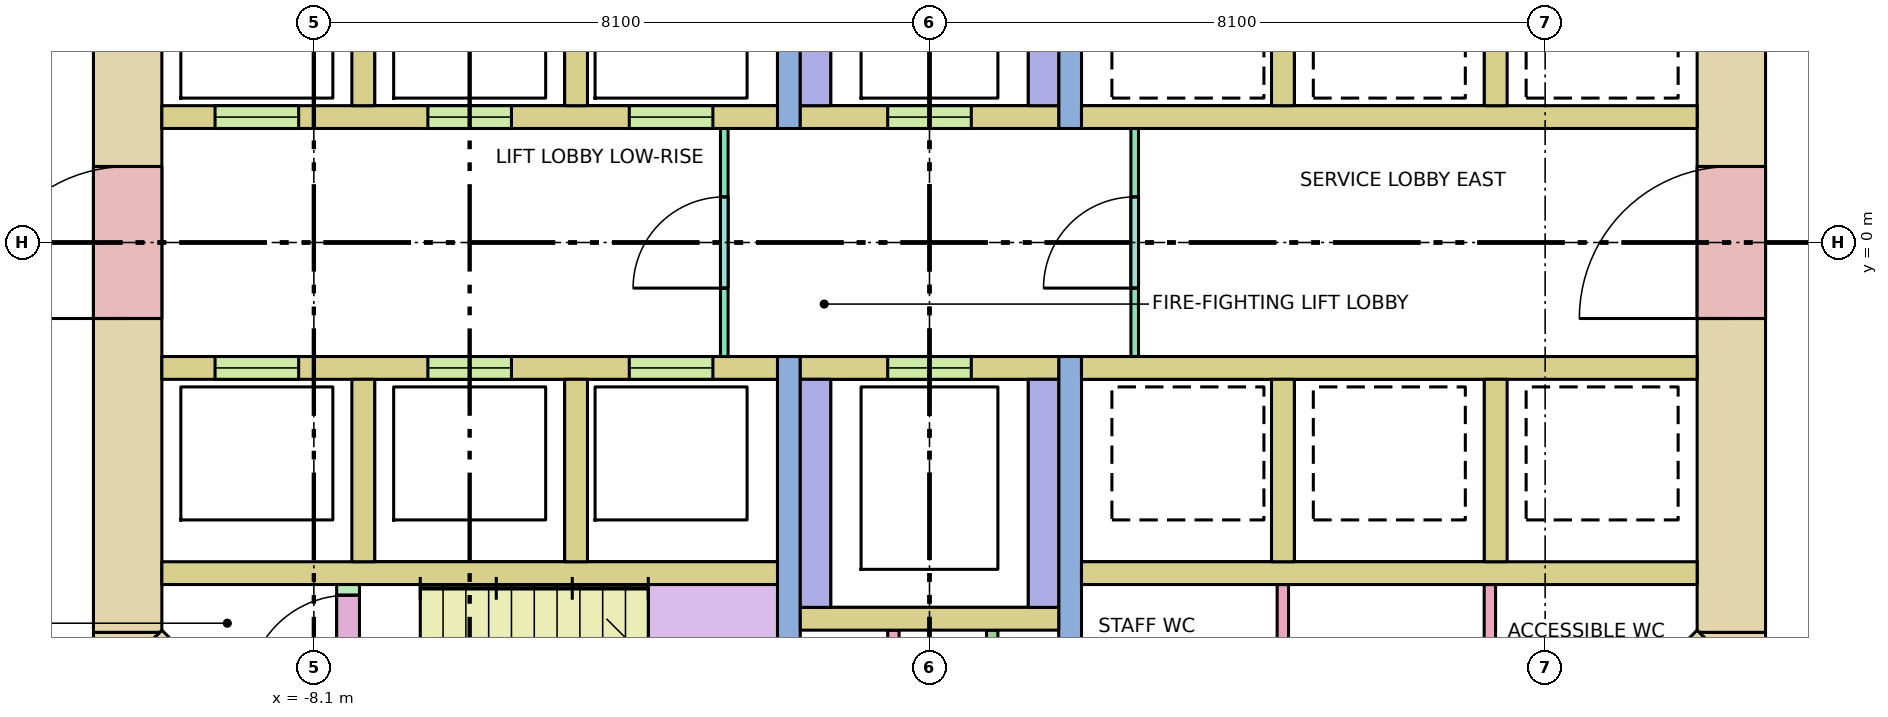
"""IFC4 building model, lengths in metres.
Left out: names, types, materials, properties, quantities, classifications, styles, units other than length and angle.
Written with IfcOpenShell. Run it as: python <this file> out.ifc"""

import sys

from ifc_helpers import new_model, si_unit, direction, frame, frame_2d, origin, place, context, subcontext, project, spatial, polyline, rectangle, outline, extrude, element, fill, save


model = new_model("IFC4")
c1 = context("Model", 3, precision=1e-05, world=origin(), true_north=direction((0.0, 1.0)))
c2 = subcontext(c1, "Body", "Model", "MODEL_VIEW")
j1 = project(units=[si_unit("LENGTHUNIT", "METRE"), si_unit("PLANEANGLEUNIT", "RADIAN")], contexts=[c1])
p1 = place(None, origin())
s1 = spatial("IfcSite", under=j1, at=p1, CompositionType="ELEMENT")
p2 = place(p1, origin())
s2 = spatial("IfcBuilding", under=s1, at=p2, CompositionType="ELEMENT")
p3 = place(p2, frame((0.0, 0.0, 116.2)))
s3 = spatial("IfcBuildingStorey", under=s2, at=p3, CompositionType="ELEMENT", Elevation=116.2)
p4 = place(p3, frame((-10.55, -5.13, -0.28), z_axis=(0.0, 0.0, 1.0), x_axis=(0.0, 1.0, 0.0)))
e1 = element("IfcWall", 1, at=p4, inside=s3, PredefinedType="SHEAR", context=c2, shape_type="SweptSolid", body=[
    extrude(rectangle(XDim=10.26, YDim=0.9, at=frame_2d((5.13, 0.0))), origin(), (0.0, 0.0, 1.0), 3.8),
])
p5 = place(p4, frame((4.13, 0.0, 0.28)))
e2 = element("IfcOpeningElement", 2, at=p5, cuts=e1, PredefinedType="OPENING", context=c2, shape_type="SweptSolid", body=[
    extrude(rectangle(XDim=2.0, YDim=2.1, at=frame_2d((1.0, 1.05))), frame((0.0, 0.46, 0.0), z_axis=(0.0, -1.0, 0.0), x_axis=(1.0, 0.0, 0.0)), (0.0, 0.0, 1.0), 0.92),
])
p6 = place(p3, frame((10.55, -5.13, -0.28), z_axis=(0.0, 0.0, 1.0), x_axis=(0.0, 1.0, 0.0)))
e3 = element("IfcWall", 3, at=p6, inside=s3, PredefinedType="SHEAR", context=c2, shape_type="SweptSolid", body=[
    extrude(rectangle(XDim=10.26, YDim=0.9, at=frame_2d((5.13, 0.0))), origin(), (0.0, 0.0, 1.0), 3.8),
])
p7 = place(p6, frame((4.13, 0.0, 0.28)))
e4 = element("IfcOpeningElement", 4, at=p7, cuts=e3, PredefinedType="OPENING", context=c2, shape_type="SweptSolid", body=[
    extrude(rectangle(XDim=2.0, YDim=2.1, at=frame_2d((1.0, 1.05))), frame((0.0, 0.46, 0.0), z_axis=(0.0, -1.0, 0.0), x_axis=(1.0, 0.0, 0.0)), (0.0, 0.0, 1.0), 0.92),
])
p8 = place(p3, frame((10.418, -5.418, -0.28), z_axis=(0.0, 0.0, 1.0), x_axis=(-0.707106781187, -0.707106781187, 0.0)))
e5 = element("IfcWall", 5, at=p8, inside=s3, PredefinedType="SHEAR", context=c2, shape_type="SweptSolid", body=[
    extrude(rectangle(XDim=4.243, YDim=0.9, at=frame_2d((2.121, 0.0))), origin(), (0.0, 0.0, 1.0), 3.8),
])
p9 = place(p8, frame((0.52, 0.0, 0.28)))
e6 = element("IfcOpeningElement", 6, at=p9, cuts=e5, PredefinedType="OPENING", context=c2, shape_type="SweptSolid", body=[
    extrude(rectangle(XDim=0.9, YDim=2.1, at=frame_2d((0.45, 1.05))), frame((0.0, 0.46, 0.0), z_axis=(0.0, -1.0, 0.0), x_axis=(1.0, 0.0, 0.0)), (0.0, 0.0, 1.0), 0.92),
])
p10 = place(p3, frame((-7.418, -8.418, -0.28), z_axis=(0.0, 0.0, 1.0), x_axis=(-0.707106781187, 0.707106781187, 0.0)))
e7 = element("IfcWall", 7, at=p10, inside=s3, PredefinedType="SHEAR", context=c2, shape_type="SweptSolid", body=[
    extrude(rectangle(XDim=4.243, YDim=0.9, at=frame_2d((2.121, 0.0))), origin(), (0.0, 0.0, 1.0), 3.8),
])
p11 = place(p10, frame((2.393, 0.0, 0.28)))
e8 = element("IfcOpeningElement", 8, at=p11, cuts=e7, PredefinedType="OPENING", context=c2, shape_type="SweptSolid", body=[
    extrude(rectangle(XDim=1.2, YDim=2.1, at=frame_2d((0.6, 1.05))), frame((0.0, 0.46, 0.0), z_axis=(0.0, -1.0, 0.0), x_axis=(1.0, 0.0, 0.0)), (0.0, 0.0, 1.0), 0.92),
])
p12 = place(p3, frame((0.0, 0.0, -0.28)))
e9 = element("IfcWall", 9, at=p12, inside=s3, PredefinedType="SHEAR", context=c2, shape_type="SweptSolid", body=[
    extrude(outline(polyline([(-11.0, -5.473), (-11.0, -5.13), (-10.13, -5.13), (-10.736, -5.736), (-11.0, -5.473)])), origin(), (0.0, 0.0, 1.0), 3.8),
])
p13 = place(p3, frame((0.0, 0.0, -0.28)))
e10 = element("IfcWall", 10, at=p13, inside=s3, PredefinedType="SHEAR", context=c2, shape_type="SweptSolid", body=[
    extrude(outline(polyline([(11.0, -5.473), (10.736, -5.736), (10.13, -5.13), (11.0, -5.13), (11.0, -5.473)])), origin(), (0.0, 0.0, 1.0), 3.8),
])
for number, where, z_axis, x_axis in (
    (11, (-10.1, -4.35, 0.0), (0.0, 0.0, 1.0), (1.0, 0.0, 0.0)),
    (12, (2.0, -4.35, 0.0), (0.0, 0.0, 1.0), (1.0, 0.0, 0.0)),
):
    element("IfcWall", number, at=place(p3, frame(where, z_axis=z_axis, x_axis=x_axis)), inside=s3, PredefinedType="SOLIDWALL", context=c2, shape_type="SweptSolid", body=[
        extrude(rectangle(XDim=8.1, YDim=0.3, at=frame_2d((4.05, 0.0))), origin(), (0.0, 0.0, 1.0), 3.52),
    ])
p14 = place(p3, frame((-10.1, 1.65, 0.0), z_axis=(0.0, 0.0, 1.0), x_axis=(1.0, 0.0, 0.0)))
e13 = element("IfcWall", 13, at=p14, inside=s3, PredefinedType="SOLIDWALL", context=c2, shape_type="SweptSolid", body=[
    extrude(rectangle(XDim=8.1, YDim=0.3, at=frame_2d((4.05, 0.0))), origin(), (0.0, 0.0, 1.0), 3.52),
])
p15 = place(p14, frame((0.7, 0.0, 0.0)))
e14 = element("IfcOpeningElement", 14, at=p15, cuts=e13, PredefinedType="OPENING", context=c2, shape_type="SweptSolid", body=[
    extrude(rectangle(XDim=1.1, YDim=2.1, at=frame_2d((0.55, 1.05))), frame((0.0, 0.16, 0.0), z_axis=(0.0, -1.0, 0.0), x_axis=(1.0, 0.0, 0.0)), (0.0, 0.0, 1.0), 0.32),
])
p16 = place(p14, frame((3.5, 0.0, 0.0)))
e15 = element("IfcOpeningElement", 15, at=p16, cuts=e13, PredefinedType="OPENING", context=c2, shape_type="SweptSolid", body=[
    extrude(rectangle(XDim=1.1, YDim=2.1, at=frame_2d((0.55, 1.05))), frame((0.0, 0.16, 0.0), z_axis=(0.0, -1.0, 0.0), x_axis=(1.0, 0.0, 0.0)), (0.0, 0.0, 1.0), 0.32),
])
p17 = place(p14, frame((6.15, 0.0, 0.0)))
e16 = element("IfcOpeningElement", 16, at=p17, cuts=e13, PredefinedType="OPENING", context=c2, shape_type="SweptSolid", body=[
    extrude(rectangle(XDim=1.1, YDim=2.1, at=frame_2d((0.55, 1.05))), frame((0.0, 0.16, 0.0), z_axis=(0.0, -1.0, 0.0), x_axis=(1.0, 0.0, 0.0)), (0.0, 0.0, 1.0), 0.32),
])
p18 = place(p3, frame((-10.1, -1.65, 0.0), z_axis=(0.0, 0.0, 1.0), x_axis=(1.0, 0.0, 0.0)))
e17 = element("IfcWall", 17, at=p18, inside=s3, PredefinedType="SOLIDWALL", context=c2, shape_type="SweptSolid", body=[
    extrude(rectangle(XDim=8.1, YDim=0.3, at=frame_2d((4.05, 0.0))), origin(), (0.0, 0.0, 1.0), 3.52),
])
p19 = place(p18, frame((0.7, 0.0, 0.0)))
e18 = element("IfcOpeningElement", 18, at=p19, cuts=e17, PredefinedType="OPENING", context=c2, shape_type="SweptSolid", body=[
    extrude(rectangle(XDim=1.1, YDim=2.1, at=frame_2d((0.55, 1.05))), frame((0.0, 0.16, 0.0), z_axis=(0.0, -1.0, 0.0), x_axis=(1.0, 0.0, 0.0)), (0.0, 0.0, 1.0), 0.32),
])
p20 = place(p18, frame((3.5, 0.0, 0.0)))
e19 = element("IfcOpeningElement", 19, at=p20, cuts=e17, PredefinedType="OPENING", context=c2, shape_type="SweptSolid", body=[
    extrude(rectangle(XDim=1.1, YDim=2.1, at=frame_2d((0.55, 1.05))), frame((0.0, 0.16, 0.0), z_axis=(0.0, -1.0, 0.0), x_axis=(1.0, 0.0, 0.0)), (0.0, 0.0, 1.0), 0.32),
])
p21 = place(p18, frame((6.15, 0.0, 0.0)))
e20 = element("IfcOpeningElement", 20, at=p21, cuts=e17, PredefinedType="OPENING", context=c2, shape_type="SweptSolid", body=[
    extrude(rectangle(XDim=1.1, YDim=2.1, at=frame_2d((0.55, 1.05))), frame((0.0, 0.16, 0.0), z_axis=(0.0, -1.0, 0.0), x_axis=(1.0, 0.0, 0.0)), (0.0, 0.0, 1.0), 0.32),
])
for number, where, z_axis, x_axis in (
    (21, (2.0, 1.65, 0.0), (0.0, 0.0, 1.0), (1.0, 0.0, 0.0)),
    (22, (2.0, -1.65, 0.0), (0.0, 0.0, 1.0), (1.0, 0.0, 0.0)),
):
    element("IfcWall", number, at=place(p3, frame(where, z_axis=z_axis, x_axis=x_axis)), inside=s3, PredefinedType="SOLIDWALL", context=c2, shape_type="SweptSolid", body=[
        extrude(rectangle(XDim=8.1, YDim=0.3, at=frame_2d((4.05, 0.0))), origin(), (0.0, 0.0, 1.0), 3.52),
    ])
for number, where, z_axis, x_axis in (
    (23, (-7.45, 1.8, 0.0), (0.0, 0.0, 1.0), (0.0, 1.0, 0.0)),
    (24, (-7.45, -4.2, 0.0), (0.0, 0.0, 1.0), (0.0, 1.0, 0.0)),
    (25, (-4.65, 1.8, 0.0), (0.0, 0.0, 1.0), (0.0, 1.0, 0.0)),
    (26, (-4.65, -4.2, 0.0), (0.0, 0.0, 1.0), (0.0, 1.0, 0.0)),
    (27, (4.65, 1.8, 0.0), (0.0, 0.0, 1.0), (0.0, 1.0, 0.0)),
    (28, (4.65, -4.2, 0.0), (0.0, 0.0, 1.0), (0.0, 1.0, 0.0)),
    (29, (7.45, 1.8, 0.0), (0.0, 0.0, 1.0), (0.0, 1.0, 0.0)),
    (30, (7.45, -4.2, 0.0), (0.0, 0.0, 1.0), (0.0, 1.0, 0.0)),
):
    element("IfcWall", number, at=place(p3, frame(where, z_axis=z_axis, x_axis=x_axis)), inside=s3, PredefinedType="SOLIDWALL", context=c2, shape_type="SweptSolid", body=[
        extrude(rectangle(XDim=2.4, YDim=0.3, at=frame_2d((1.2, 0.0))), origin(), (0.0, 0.0, 1.0), 3.52),
    ])
for number, where, z_axis, x_axis in (
    (31, (-1.85, 1.5, 0.0), (0.0, 0.0, 1.0), (0.0, 1.0, 0.0)),
    (32, (-1.85, -8.1, 0.0), (0.0, 0.0, 1.0), (0.0, 1.0, 0.0)),
    (33, (1.85, 1.5, 0.0), (0.0, 0.0, 1.0), (0.0, 1.0, 0.0)),
    (34, (1.85, -8.1, 0.0), (0.0, 0.0, 1.0), (0.0, 1.0, 0.0)),
):
    element("IfcWall", number, at=place(p3, frame(where, z_axis=z_axis, x_axis=x_axis)), inside=s3, PredefinedType="SHEAR", context=c2, shape_type="SweptSolid", body=[
        extrude(rectangle(XDim=6.6, YDim=0.3, at=frame_2d((3.3, 0.0))), origin(), (0.0, 0.0, 1.0), 3.52),
    ])
p22 = place(p3, frame((-1.7, 1.65, 0.0), z_axis=(0.0, 0.0, 1.0), x_axis=(1.0, 0.0, 0.0)))
e35 = element("IfcWall", 35, at=p22, inside=s3, PredefinedType="SOLIDWALL", context=c2, shape_type="SweptSolid", body=[
    extrude(rectangle(XDim=3.4, YDim=0.3, at=frame_2d((1.7, 0.0))), origin(), (0.0, 0.0, 1.0), 3.52),
])
p23 = place(p22, frame((1.15, 0.0, 0.0)))
e36 = element("IfcOpeningElement", 36, at=p23, cuts=e35, PredefinedType="OPENING", context=c2, shape_type="SweptSolid", body=[
    extrude(rectangle(XDim=1.1, YDim=2.1, at=frame_2d((0.55, 1.05))), frame((0.0, 0.16, 0.0), z_axis=(0.0, -1.0, 0.0), x_axis=(1.0, 0.0, 0.0)), (0.0, 0.0, 1.0), 0.32),
])
p24 = place(p3, frame((-1.7, -1.65, 0.0), z_axis=(0.0, 0.0, 1.0), x_axis=(1.0, 0.0, 0.0)))
e37 = element("IfcWall", 37, at=p24, inside=s3, PredefinedType="SOLIDWALL", context=c2, shape_type="SweptSolid", body=[
    extrude(rectangle(XDim=3.4, YDim=0.3, at=frame_2d((1.7, 0.0))), origin(), (0.0, 0.0, 1.0), 3.52),
])
p25 = place(p24, frame((1.15, 0.0, 0.0)))
e38 = element("IfcOpeningElement", 38, at=p25, cuts=e37, PredefinedType="OPENING", context=c2, shape_type="SweptSolid", body=[
    extrude(rectangle(XDim=1.1, YDim=2.1, at=frame_2d((0.55, 1.05))), frame((0.0, 0.16, 0.0), z_axis=(0.0, -1.0, 0.0), x_axis=(1.0, 0.0, 0.0)), (0.0, 0.0, 1.0), 0.32),
])
for number, where, z_axis, x_axis in (
    (39, (-1.5, 1.8, 0.0), (0.0, 0.0, 1.0), (0.0, 1.0, 0.0)),
    (40, (-1.5, -4.8, 0.0), (0.0, 0.0, 1.0), (0.0, 1.0, 0.0)),
    (41, (1.5, 1.8, 0.0), (0.0, 0.0, 1.0), (0.0, 1.0, 0.0)),
    (42, (1.5, -4.8, 0.0), (0.0, 0.0, 1.0), (0.0, 1.0, 0.0)),
):
    element("IfcWall", number, at=place(p3, frame(where, z_axis=z_axis, x_axis=x_axis)), inside=s3, PredefinedType="SOLIDWALL", context=c2, shape_type="SweptSolid", body=[
        extrude(rectangle(XDim=3.0, YDim=0.4, at=frame_2d((1.5, 0.0))), origin(), (0.0, 0.0, 1.0), 3.52),
    ])
p26 = place(p3, frame((-1.7, -4.95, 0.0), z_axis=(0.0, 0.0, 1.0), x_axis=(1.0, 0.0, 0.0)))
e43 = element("IfcWall", 43, at=p26, inside=s3, PredefinedType="SOLIDWALL", context=c2, shape_type="SweptSolid", body=[
    extrude(rectangle(XDim=3.4, YDim=0.3, at=frame_2d((1.7, 0.0))), origin(), (0.0, 0.0, 1.0), 3.52),
])
p27 = place(p3, frame((-7.65, -7.64, 0.0), z_axis=(0.0, 0.0, 1.0), x_axis=(0.0, 1.0, 0.0)))
e44 = element("IfcWall", 44, at=p27, inside=s3, PredefinedType="SHEAR", context=c2, shape_type="SweptSolid", body=[
    extrude(rectangle(XDim=3.14, YDim=0.3, at=frame_2d((1.57, 0.0))), origin(), (0.0, 0.0, 1.0), 3.52),
])
p28 = place(p27, frame((1.68, 0.0, 0.0)))
e45 = element("IfcOpeningElement", 45, at=p28, cuts=e44, PredefinedType="OPENING", context=c2, shape_type="SweptSolid", body=[
    extrude(rectangle(XDim=1.32, YDim=2.1, at=frame_2d((0.66, 1.05))), frame((0.0, 0.16, 0.0), z_axis=(0.0, -1.0, 0.0), x_axis=(1.0, 0.0, 0.0)), (0.0, 0.0, 1.0), 0.32),
])
p29 = place(p3, frame((-2.7, -1.5, 0.0), z_axis=(0.0, 0.0, 1.0), x_axis=(0.0, 1.0, 0.0)))
e46 = element("IfcWall", 46, at=p29, inside=s3, PredefinedType="PARTITIONING", context=c2, shape_type="SweptSolid", body=[
    extrude(rectangle(XDim=3.0, YDim=0.1, at=frame_2d((1.5, 0.0))), origin(), (0.0, 0.0, 1.0), 3.52),
])
p30 = place(p29, frame((0.9, 0.0, 0.0)))
e47 = element("IfcOpeningElement", 47, at=p30, cuts=e46, PredefinedType="OPENING", context=c2, shape_type="SweptSolid", body=[
    extrude(rectangle(XDim=1.2, YDim=2.1, at=frame_2d((0.6, 1.05))), frame((0.0, 0.06, 0.0), z_axis=(0.0, -1.0, 0.0), x_axis=(1.0, 0.0, 0.0)), (0.0, 0.0, 1.0), 0.12),
])
p31 = place(p3, frame((2.7, -1.5, 0.0), z_axis=(0.0, 0.0, 1.0), x_axis=(0.0, 1.0, 0.0)))
e48 = element("IfcWall", 48, at=p31, inside=s3, PredefinedType="PARTITIONING", context=c2, shape_type="SweptSolid", body=[
    extrude(rectangle(XDim=3.0, YDim=0.1, at=frame_2d((1.5, 0.0))), origin(), (0.0, 0.0, 1.0), 3.52),
])
p32 = place(p31, frame((0.9, 0.0, 0.0)))
e49 = element("IfcOpeningElement", 49, at=p32, cuts=e48, PredefinedType="OPENING", context=c2, shape_type="SweptSolid", body=[
    extrude(rectangle(XDim=1.2, YDim=2.1, at=frame_2d((0.6, 1.05))), frame((0.0, 0.06, 0.0), z_axis=(0.0, -1.0, 0.0), x_axis=(1.0, 0.0, 0.0)), (0.0, 0.0, 1.0), 0.12),
])
for number, where, z_axis, x_axis in (
    (50, (0.825, -8.1, 0.0), (0.0, 0.0, 1.0), (0.0, 1.0, 0.0)),
    (51, (-0.475, -8.1, 0.0), (0.0, 0.0, 1.0), (0.0, 1.0, 0.0)),
):
    element("IfcWall", number, at=place(p3, frame(where, z_axis=z_axis, x_axis=x_axis)), inside=s3, PredefinedType="PARTITIONING", context=c2, shape_type="SweptSolid", body=[
        extrude(rectangle(XDim=3.0, YDim=0.15, at=frame_2d((1.5, 0.0))), origin(), (0.0, 0.0, 1.0), 3.52),
    ])
p33 = place(p3, frame((4.649, -8.1, 0.0), z_axis=(0.0, 0.0, 1.0), x_axis=(0.0, 1.0, 0.0)))
e52 = element("IfcWall", 52, at=p33, inside=s3, PredefinedType="PARTITIONING", context=c2, shape_type="SweptSolid", body=[
    extrude(rectangle(XDim=3.6, YDim=0.15, at=frame_2d((1.8, 0.0))), origin(), (0.0, 0.0, 1.0), 3.52),
])
p34 = place(p3, frame((7.373, -7.752, 0.0), z_axis=(0.0, 0.0, 1.0), x_axis=(0.0, 1.0, 0.0)))
e53 = element("IfcWall", 53, at=p34, inside=s3, PredefinedType="PARTITIONING", context=c2, shape_type="SweptSolid", body=[
    extrude(rectangle(XDim=3.252, YDim=0.15, at=frame_2d((1.626, 0.0))), origin(), (0.0, 0.0, 1.0), 3.52),
])
p35 = place(p15, origin())
e54 = element("IfcDoor", 54, at=p35, inside=s3, OperationType="DOUBLE_DOOR_SLIDING", PredefinedType="DOOR", context=c2, shape_type="SweptSolid", body=[
    extrude(rectangle(XDim=1.1, YDim=2.1, at=frame_2d((0.55, 1.05))), frame((0.0, 0.025, 0.0), z_axis=(0.0, -1.0, 0.0), x_axis=(1.0, 0.0, 0.0)), (0.0, 0.0, 1.0), 0.05),
])
fill(e14, e54)
p36 = place(p16, origin())
e55 = element("IfcDoor", 55, at=p36, inside=s3, OperationType="DOUBLE_DOOR_SLIDING", PredefinedType="DOOR", context=c2, shape_type="SweptSolid", body=[
    extrude(rectangle(XDim=1.1, YDim=2.1, at=frame_2d((0.55, 1.05))), frame((0.0, 0.025, 0.0), z_axis=(0.0, -1.0, 0.0), x_axis=(1.0, 0.0, 0.0)), (0.0, 0.0, 1.0), 0.05),
])
fill(e15, e55)
p37 = place(p17, origin())
e56 = element("IfcDoor", 56, at=p37, inside=s3, OperationType="DOUBLE_DOOR_SLIDING", PredefinedType="DOOR", context=c2, shape_type="SweptSolid", body=[
    extrude(rectangle(XDim=1.1, YDim=2.1, at=frame_2d((0.55, 1.05))), frame((0.0, 0.025, 0.0), z_axis=(0.0, -1.0, 0.0), x_axis=(1.0, 0.0, 0.0)), (0.0, 0.0, 1.0), 0.05),
])
fill(e16, e56)
p38 = place(p19, origin())
e57 = element("IfcDoor", 57, at=p38, inside=s3, OperationType="DOUBLE_DOOR_SLIDING", PredefinedType="DOOR", context=c2, shape_type="SweptSolid", body=[
    extrude(rectangle(XDim=1.1, YDim=2.1, at=frame_2d((0.55, 1.05))), frame((0.0, 0.025, 0.0), z_axis=(0.0, -1.0, 0.0), x_axis=(1.0, 0.0, 0.0)), (0.0, 0.0, 1.0), 0.05),
])
fill(e18, e57)
p39 = place(p20, origin())
e58 = element("IfcDoor", 58, at=p39, inside=s3, OperationType="DOUBLE_DOOR_SLIDING", PredefinedType="DOOR", context=c2, shape_type="SweptSolid", body=[
    extrude(rectangle(XDim=1.1, YDim=2.1, at=frame_2d((0.55, 1.05))), frame((0.0, 0.025, 0.0), z_axis=(0.0, -1.0, 0.0), x_axis=(1.0, 0.0, 0.0)), (0.0, 0.0, 1.0), 0.05),
])
fill(e19, e58)
p40 = place(p21, origin())
e59 = element("IfcDoor", 59, at=p40, inside=s3, OperationType="DOUBLE_DOOR_SLIDING", PredefinedType="DOOR", context=c2, shape_type="SweptSolid", body=[
    extrude(rectangle(XDim=1.1, YDim=2.1, at=frame_2d((0.55, 1.05))), frame((0.0, 0.025, 0.0), z_axis=(0.0, -1.0, 0.0), x_axis=(1.0, 0.0, 0.0)), (0.0, 0.0, 1.0), 0.05),
])
fill(e20, e59)
p41 = place(p23, origin())
e60 = element("IfcDoor", 60, at=p41, inside=s3, OperationType="DOUBLE_DOOR_SLIDING", PredefinedType="DOOR", context=c2, shape_type="SweptSolid", body=[
    extrude(rectangle(XDim=1.1, YDim=2.1, at=frame_2d((0.55, 1.05))), frame((0.0, 0.025, 0.0), z_axis=(0.0, -1.0, 0.0), x_axis=(1.0, 0.0, 0.0)), (0.0, 0.0, 1.0), 0.05),
])
fill(e36, e60)
p42 = place(p25, origin())
e61 = element("IfcDoor", 61, at=p42, inside=s3, OperationType="DOUBLE_DOOR_SLIDING", PredefinedType="DOOR", context=c2, shape_type="SweptSolid", body=[
    extrude(rectangle(XDim=1.1, YDim=2.1, at=frame_2d((0.55, 1.05))), frame((0.0, 0.025, 0.0), z_axis=(0.0, -1.0, 0.0), x_axis=(1.0, 0.0, 0.0)), (0.0, 0.0, 1.0), 0.05),
])
fill(e38, e61)
p43 = place(p28, origin())
e62 = element("IfcDoor", 62, at=p43, inside=s3, OperationType="DOUBLE_DOOR_SINGLE_SWING", PredefinedType="DOOR", context=c2, shape_type="SweptSolid", body=[
    extrude(rectangle(XDim=1.32, YDim=2.1, at=frame_2d((0.66, 1.05))), frame((0.0, 0.025, 0.0), z_axis=(0.0, -1.0, 0.0), x_axis=(1.0, 0.0, 0.0)), (0.0, 0.0, 1.0), 0.05),
])
fill(e45, e62)
p44 = place(p5, origin())
e63 = element("IfcDoor", 63, at=p44, inside=s3, OperationType="DOUBLE_DOOR_SINGLE_SWING", PredefinedType="DOOR", context=c2, shape_type="SweptSolid", body=[
    extrude(rectangle(XDim=2.0, YDim=2.1, at=frame_2d((1.0, 1.05))), frame((0.0, 0.025, 0.0), z_axis=(0.0, -1.0, 0.0), x_axis=(1.0, 0.0, 0.0)), (0.0, 0.0, 1.0), 0.05),
])
fill(e2, e63)
p45 = place(p7, origin())
e64 = element("IfcDoor", 64, at=p45, inside=s3, OperationType="DOUBLE_DOOR_SINGLE_SWING", PredefinedType="DOOR", context=c2, shape_type="SweptSolid", body=[
    extrude(rectangle(XDim=2.0, YDim=2.1, at=frame_2d((1.0, 1.05))), frame((0.0, 0.025, 0.0), z_axis=(0.0, -1.0, 0.0), x_axis=(1.0, 0.0, 0.0)), (0.0, 0.0, 1.0), 0.05),
])
fill(e4, e64)
p46 = place(p30, origin())
e65 = element("IfcDoor", 65, at=p46, inside=s3, OperationType="SINGLE_SWING_LEFT", PredefinedType="DOOR", context=c2, shape_type="SweptSolid", body=[
    extrude(rectangle(XDim=1.2, YDim=2.1, at=frame_2d((0.6, 1.05))), frame((0.0, 0.025, 0.0), z_axis=(0.0, -1.0, 0.0), x_axis=(1.0, 0.0, 0.0)), (0.0, 0.0, 1.0), 0.05),
])
fill(e47, e65)
p47 = place(p32, origin())
e66 = element("IfcDoor", 66, at=p47, inside=s3, OperationType="SINGLE_SWING_LEFT", PredefinedType="DOOR", context=c2, shape_type="SweptSolid", body=[
    extrude(rectangle(XDim=1.2, YDim=2.1, at=frame_2d((0.6, 1.05))), frame((0.0, 0.025, 0.0), z_axis=(0.0, -1.0, 0.0), x_axis=(1.0, 0.0, 0.0)), (0.0, 0.0, 1.0), 0.05),
])
fill(e49, e66)
save(model, sys.argv[1])
